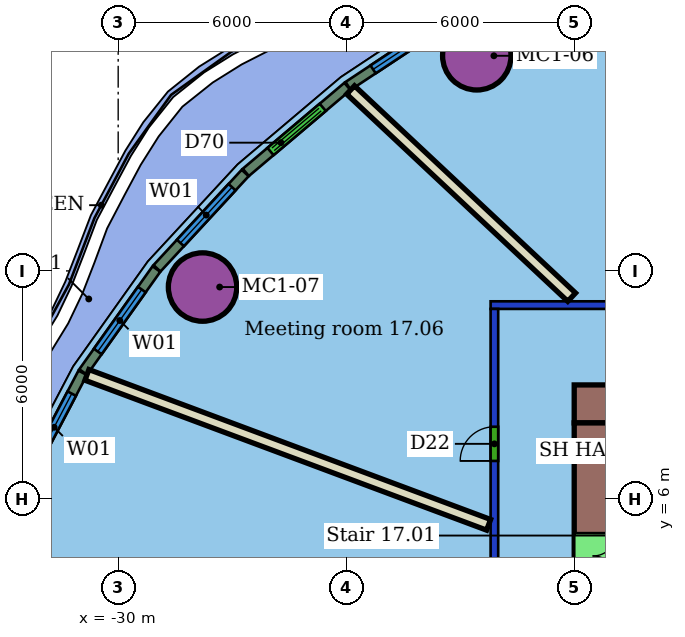
"""IFC4 building model, lengths in metres.
Left out: names, types, materials, properties, quantities, classifications, styles, units other than length and angle.
Written with IfcOpenShell. Run it as: python <this file> out.ifc"""

import sys

from ifc_helpers import new_model, si_unit, direction, frame, frame_2d, origin, origin_2d, place, context, subcontext, project, spatial, rectangle, hollow_circle, extrude, element, fill, save


model = new_model("IFC4")
c1 = context("Model", 3, precision=1e-05, world=origin(), true_north=direction((0.0, 1.0)))
c2 = subcontext(c1, "Body", "Model", "MODEL_VIEW")
j1 = project(units=[si_unit("LENGTHUNIT", "METRE"), si_unit("PLANEANGLEUNIT", "RADIAN")], contexts=[c1])
p1 = place(None, origin())
s1 = spatial("IfcSite", under=j1, at=p1, CompositionType="ELEMENT")
p2 = place(p1, origin())
s2 = spatial("IfcBuilding", under=s1, at=p2, CompositionType="ELEMENT")
p3 = place(p2, frame((0.0, 0.0, 80.4)))
s3 = spatial("IfcBuildingStorey", under=s2, at=p3, CompositionType="ELEMENT", Elevation=80.4)
for number, where, z_axis, x_axis in (
    (1, (-20.563, 17.66, 0.0), (0.0, 0.0, 1.0), (1.0, 0.0, 0.0)),
    (2, (-27.78, 11.576, 0.0), (0.0, 0.0, 1.0), (1.0, 0.0, 0.0)),
):
    element("IfcColumn", number, at=place(p3, frame(where, z_axis=z_axis, x_axis=x_axis)), inside=s3, PredefinedType="COLUMN", context=c2, shape_type="SweptSolid", body=[
        extrude(hollow_circle(Radius=0.9, WallThickness=0.06, at=origin_2d()), origin(), (0.0, 0.0, 1.0), 3.5),
    ])
p4 = place(p3, frame((-20.1, -11.0, 0.0), z_axis=(0.0, 0.0, 1.0), x_axis=(0.0, 1.0, 0.0)))
e3 = element("IfcWall", 3, at=p4, inside=s3, PredefinedType="PARTITIONING", context=c2, shape_type="SweptSolid", body=[
    extrude(rectangle(XDim=22.0, YDim=0.2, at=frame_2d((11.0, 0.0))), origin(), (0.0, 0.0, 1.0), 2.8),
])
p5 = place(p4, frame((18.0, 0.0, 0.0)))
e4 = element("IfcOpeningElement", 4, at=p5, cuts=e3, PredefinedType="OPENING", context=c2, shape_type="SweptSolid", body=[
    extrude(rectangle(XDim=0.9, YDim=2.1, at=frame_2d((0.45, 1.05))), frame((0.0, 0.11, 0.0), z_axis=(0.0, -1.0, 0.0), x_axis=(1.0, 0.0, 0.0)), (0.0, 0.0, 1.0), 0.22),
])
p6 = place(p4, frame((13.798, 0.0, 0.0)))
e5 = element("IfcOpeningElement", 5, at=p6, cuts=e3, PredefinedType="OPENING", context=c2, shape_type="SweptSolid", body=[
    extrude(rectangle(XDim=1.1, YDim=2.1, at=frame_2d((0.55, 1.05))), frame((0.0, 0.11, 0.0), z_axis=(0.0, -1.0, 0.0), x_axis=(1.0, 0.0, 0.0)), (0.0, 0.0, 1.0), 0.22),
])
p7 = place(p4, frame((8.872, 0.0, 0.0)))
e6 = element("IfcOpeningElement", 6, at=p7, cuts=e3, PredefinedType="OPENING", context=c2, shape_type="SweptSolid", body=[
    extrude(rectangle(XDim=1.2, YDim=2.1, at=frame_2d((0.6, 1.05))), frame((0.0, 0.11, 0.0), z_axis=(0.0, -1.0, 0.0), x_axis=(1.0, 0.0, 0.0)), (0.0, 0.0, 1.0), 0.22),
])
p8 = place(p4, frame((5.6, 0.0, 0.0)))
e7 = element("IfcOpeningElement", 7, at=p8, cuts=e3, PredefinedType="OPENING", context=c2, shape_type="SweptSolid", body=[
    extrude(rectangle(XDim=1.0, YDim=2.1, at=frame_2d((0.5, 1.05))), frame((0.0, 0.11, 0.0), z_axis=(0.0, -1.0, 0.0), x_axis=(1.0, 0.0, 0.0)), (0.0, 0.0, 1.0), 0.22),
])
p9 = place(p3, frame((-20.2, 11.1, 0.0), z_axis=(0.0, 0.0, 1.0), x_axis=(1.0, 0.0, 0.0)))
e8 = element("IfcWall", 8, at=p9, inside=s3, PredefinedType="PARTITIONING", context=c2, shape_type="SweptSolid", body=[
    extrude(rectangle(XDim=28.4, YDim=0.2, at=frame_2d((14.2, 0.0))), origin(), (0.0, 0.0, 1.0), 2.8),
])
p10 = place(p9, frame((24.754, 0.0, 0.0)))
e9 = element("IfcOpeningElement", 9, at=p10, cuts=e8, PredefinedType="OPENING", context=c2, shape_type="SweptSolid", body=[
    extrude(rectangle(XDim=1.0, YDim=2.1, at=frame_2d((0.5, 1.05))), frame((0.0, 0.11, 0.0), z_axis=(0.0, -1.0, 0.0), x_axis=(1.0, 0.0, 0.0)), (0.0, 0.0, 1.0), 0.22),
])
p11 = place(p9, frame((18.838, 0.0, 0.0)))
e10 = element("IfcOpeningElement", 10, at=p11, cuts=e8, PredefinedType="OPENING", context=c2, shape_type="SweptSolid", body=[
    extrude(rectangle(XDim=1.5, YDim=2.1, at=frame_2d((0.75, 1.05))), frame((0.0, 0.11, 0.0), z_axis=(0.0, -1.0, 0.0), x_axis=(1.0, 0.0, 0.0)), (0.0, 0.0, 1.0), 0.22),
])
p12 = place(p9, frame((14.85, 0.0, 0.0)))
e11 = element("IfcOpeningElement", 11, at=p12, cuts=e8, PredefinedType="OPENING", context=c2, shape_type="SweptSolid", body=[
    extrude(rectangle(XDim=0.9, YDim=2.1, at=frame_2d((0.45, 1.05))), frame((0.0, 0.11, 0.0), z_axis=(0.0, -1.0, 0.0), x_axis=(1.0, 0.0, 0.0)), (0.0, 0.0, 1.0), 0.22),
])
p13 = place(p9, frame((7.977, 0.0, 0.0)))
e12 = element("IfcOpeningElement", 12, at=p13, cuts=e8, PredefinedType="OPENING", context=c2, shape_type="SweptSolid", body=[
    extrude(rectangle(XDim=1.2, YDim=2.1, at=frame_2d((0.6, 1.05))), frame((0.0, 0.11, 0.0), z_axis=(0.0, -1.0, 0.0), x_axis=(1.0, 0.0, 0.0)), (0.0, 0.0, 1.0), 0.22),
])
p14 = place(p3, frame((-23.884, 16.761, 0.0), z_axis=(0.0, 0.0, 1.0), x_axis=(0.729643205367, -0.683828043343, 0.0)))
e13 = element("IfcWall", 13, at=p14, inside=s3, PredefinedType="PARTITIONING", context=c2, shape_type="SweptSolid", body=[
    extrude(rectangle(XDim=7.972, YDim=0.3, at=frame_2d((3.986, 0.0))), origin(), (0.0, 0.0, 1.0), 3.5),
])
p15 = place(p3, frame((-30.822, 9.264, 0.0), z_axis=(0.0, 0.0, 1.0), x_axis=(0.936877624621, -0.349657427326, 0.0)))
e14 = element("IfcWall", 14, at=p15, inside=s3, PredefinedType="PARTITIONING", context=c2, shape_type="SweptSolid", body=[
    extrude(rectangle(XDim=11.282, YDim=0.3, at=frame_2d((5.641, 0.0))), origin(), (0.0, 0.0, 1.0), 3.5),
])
p16 = place(p3, frame((-20.968, 18.843, 0.0), z_axis=(0.0, 0.0, 1.0), x_axis=(-0.833653527953, -0.552287783073, 0.0)))
e15 = element("IfcWall", 15, at=p16, inside=s3, PredefinedType="SOLIDWALL", context=c2, shape_type="SweptSolid", body=[
    extrude(rectangle(XDim=3.577, YDim=0.25, at=frame_2d((1.788, 0.0))), origin(), (0.0, 0.0, 1.0), 3.1),
])
p17 = place(p16, frame((0.788, 0.0, 0.8)))
e16 = element("IfcOpeningElement", 16, at=p17, cuts=e15, PredefinedType="OPENING", context=c2, shape_type="SweptSolid", body=[
    extrude(rectangle(XDim=2.0, YDim=2.2, at=frame_2d((1.0, 1.1))), frame((0.0, 0.135, 0.0), z_axis=(0.0, -1.0, 0.0), x_axis=(1.0, 0.0, 0.0)), (0.0, 0.0, 1.0), 0.27),
])
p18 = place(p3, frame((-23.968, 16.854, 0.0), z_axis=(0.0, 0.0, 1.0), x_axis=(-0.76352642001, -0.645776591358, 0.0)))
e17 = element("IfcWall", 17, at=p18, inside=s3, PredefinedType="SOLIDWALL", context=c2, shape_type="SweptSolid", body=[
    extrude(rectangle(XDim=3.502, YDim=0.25, at=frame_2d((1.751, 0.0))), origin(), (0.0, 0.0, 1.0), 3.1),
])
p19 = place(p18, frame((0.851, 0.0, 0.0)))
e18 = element("IfcOpeningElement", 18, at=p19, cuts=e17, PredefinedType="OPENING", context=c2, shape_type="SweptSolid", body=[
    extrude(rectangle(XDim=1.8, YDim=2.4, at=frame_2d((0.9, 1.2))), frame((0.0, 0.135, 0.0), z_axis=(0.0, -1.0, 0.0), x_axis=(1.0, 0.0, 0.0)), (0.0, 0.0, 1.0), 0.27),
])
p20 = place(p3, frame((-26.658, 14.576, 0.0), z_axis=(0.0, 0.0, 1.0), x_axis=(-0.679170019498, -0.733980983824, 0.0)))
e19 = element("IfcWall", 19, at=p20, inside=s3, PredefinedType="SOLIDWALL", context=c2, shape_type="SweptSolid", body=[
    extrude(rectangle(XDim=3.417, YDim=0.25, at=frame_2d((1.708, 0.0))), origin(), (0.0, 0.0, 1.0), 3.1),
])
p21 = place(p20, frame((0.508, 0.0, 0.8)))
e20 = element("IfcOpeningElement", 20, at=p21, cuts=e19, PredefinedType="OPENING", context=c2, shape_type="SweptSolid", body=[
    extrude(rectangle(XDim=2.0, YDim=2.2, at=frame_2d((1.0, 1.1))), frame((0.0, 0.135, 0.0), z_axis=(0.0, -1.0, 0.0), x_axis=(1.0, 0.0, 0.0)), (0.0, 0.0, 1.0), 0.27),
])
p22 = place(p3, frame((-28.994, 12.05, 0.0), z_axis=(0.0, 0.0, 1.0), x_axis=(-0.579570373791, -0.814922193724, 0.0)))
e21 = element("IfcWall", 21, at=p22, inside=s3, PredefinedType="SOLIDWALL", context=c2, shape_type="SweptSolid", body=[
    extrude(rectangle(XDim=3.326, YDim=0.25, at=frame_2d((1.663, 0.0))), origin(), (0.0, 0.0, 1.0), 3.1),
])
p23 = place(p22, frame((0.663, 0.0, 0.8)))
e22 = element("IfcOpeningElement", 22, at=p23, cuts=e21, PredefinedType="OPENING", context=c2, shape_type="SweptSolid", body=[
    extrude(rectangle(XDim=2.0, YDim=2.2, at=frame_2d((1.0, 1.1))), frame((0.0, 0.135, 0.0), z_axis=(0.0, -1.0, 0.0), x_axis=(1.0, 0.0, 0.0)), (0.0, 0.0, 1.0), 0.27),
])
p24 = place(p3, frame((-30.935, 9.318, 0.0), z_axis=(0.0, 0.0, 1.0), x_axis=(-0.464455263318, -0.885596583314, 0.0)))
e23 = element("IfcWall", 23, at=p24, inside=s3, PredefinedType="SOLIDWALL", context=c2, shape_type="SweptSolid", body=[
    extrude(rectangle(XDim=3.235, YDim=0.25, at=frame_2d((1.618, 0.0))), origin(), (0.0, 0.0, 1.0), 3.1),
])
p25 = place(p24, frame((0.618, 0.0, 0.8)))
e24 = element("IfcOpeningElement", 24, at=p25, cuts=e23, PredefinedType="OPENING", context=c2, shape_type="SweptSolid", body=[
    extrude(rectangle(XDim=2.0, YDim=2.2, at=frame_2d((1.0, 1.1))), frame((0.0, 0.135, 0.0), z_axis=(0.0, -1.0, 0.0), x_axis=(1.0, 0.0, 0.0)), (0.0, 0.0, 1.0), 0.27),
])
p26 = place(p3, frame((-6.0, 8.5, 0.0), z_axis=(0.0, 0.0, 1.0), x_axis=(-1.0, 0.0, 0.0)))
e25 = element("IfcWall", 25, at=p26, inside=s3, PredefinedType="SHEAR", context=c2, shape_type="SweptSolid", body=[
    extrude(rectangle(XDim=12.0, YDim=1.0, at=frame_2d((6.0, 0.0))), origin(), (0.0, 0.0, 1.0), 3.4),
])
p27 = place(p26, frame((5.2, 0.0, 0.0)))
e26 = element("IfcOpeningElement", 26, at=p27, cuts=e25, PredefinedType="OPENING", context=c2, shape_type="SweptSolid", body=[
    extrude(rectangle(XDim=1.2, YDim=2.1, at=frame_2d((0.6, 1.05))), frame((0.0, 0.51, 0.0), z_axis=(0.0, -1.0, 0.0), x_axis=(1.0, 0.0, 0.0)), (0.0, 0.0, 1.0), 1.02),
])
p28 = place(p3, frame((-17.5, 8.0, 0.0), z_axis=(0.0, 0.0, 1.0), x_axis=(0.0, -1.0, 0.0)))
e27 = element("IfcWall", 27, at=p28, inside=s3, PredefinedType="SHEAR", context=c2, shape_type="SweptSolid", body=[
    extrude(rectangle(XDim=16.0, YDim=1.0, at=frame_2d((8.0, 0.0))), origin(), (0.0, 0.0, 1.0), 3.4),
])
p29 = place(p28, frame((11.9, 0.0, 0.0)))
e28 = element("IfcOpeningElement", 28, at=p29, cuts=e27, PredefinedType="OPENING", context=c2, shape_type="SweptSolid", body=[
    extrude(rectangle(XDim=1.2, YDim=2.1, at=frame_2d((0.6, 1.05))), frame((0.0, 0.51, 0.0), z_axis=(0.0, -1.0, 0.0), x_axis=(1.0, 0.0, 0.0)), (0.0, 0.0, 1.0), 1.02),
])
p30 = place(p28, frame((2.9, 0.0, 0.0)))
e29 = element("IfcOpeningElement", 29, at=p30, cuts=e27, PredefinedType="OPENING", context=c2, shape_type="SweptSolid", body=[
    extrude(rectangle(XDim=1.2, YDim=2.1, at=frame_2d((0.6, 1.05))), frame((0.0, 0.51, 0.0), z_axis=(0.0, -1.0, 0.0), x_axis=(1.0, 0.0, 0.0)), (0.0, 0.0, 1.0), 1.02),
])
p31 = place(p5, origin())
e30 = element("IfcDoor", 30, at=p31, inside=s3, OperationType="SINGLE_SWING_LEFT", PredefinedType="DOOR", context=c2, shape_type="SweptSolid", body=[
    extrude(rectangle(XDim=0.9, YDim=2.1, at=frame_2d((0.45, 1.05))), frame((0.0, 0.025, 0.0), z_axis=(0.0, -1.0, 0.0), x_axis=(1.0, 0.0, 0.0)), (0.0, 0.0, 1.0), 0.05),
])
fill(e4, e30)
p32 = place(p17, origin())
e31 = element("IfcWindow", 31, at=p32, inside=s3, PartitioningType="SINGLE_PANEL", PredefinedType="WINDOW", context=c2, shape_type="SweptSolid", body=[
    extrude(rectangle(XDim=2.0, YDim=2.2, at=frame_2d((1.0, 1.1))), frame((0.0, 0.03, 0.0), z_axis=(0.0, -1.0, 0.0), x_axis=(1.0, 0.0, 0.0)), (0.0, 0.0, 1.0), 0.06),
])
fill(e16, e31)
p33 = place(p19, origin())
e32 = element("IfcDoor", 32, at=p33, inside=s3, OperationType="DOUBLE_DOOR_SLIDING", PredefinedType="DOOR", context=c2, shape_type="SweptSolid", body=[
    extrude(rectangle(XDim=1.8, YDim=2.4, at=frame_2d((0.9, 1.2))), frame((0.0, 0.025, 0.0), z_axis=(0.0, -1.0, 0.0), x_axis=(1.0, 0.0, 0.0)), (0.0, 0.0, 1.0), 0.05),
])
fill(e18, e32)
p34 = place(p21, origin())
e33 = element("IfcWindow", 33, at=p34, inside=s3, PartitioningType="SINGLE_PANEL", PredefinedType="WINDOW", context=c2, shape_type="SweptSolid", body=[
    extrude(rectangle(XDim=2.0, YDim=2.2, at=frame_2d((1.0, 1.1))), frame((0.0, 0.03, 0.0), z_axis=(0.0, -1.0, 0.0), x_axis=(1.0, 0.0, 0.0)), (0.0, 0.0, 1.0), 0.06),
])
fill(e20, e33)
p35 = place(p23, origin())
e34 = element("IfcWindow", 34, at=p35, inside=s3, PartitioningType="SINGLE_PANEL", PredefinedType="WINDOW", context=c2, shape_type="SweptSolid", body=[
    extrude(rectangle(XDim=2.0, YDim=2.2, at=frame_2d((1.0, 1.1))), frame((0.0, 0.03, 0.0), z_axis=(0.0, -1.0, 0.0), x_axis=(1.0, 0.0, 0.0)), (0.0, 0.0, 1.0), 0.06),
])
fill(e22, e34)
p36 = place(p25, origin())
e35 = element("IfcWindow", 35, at=p36, inside=s3, PartitioningType="SINGLE_PANEL", PredefinedType="WINDOW", context=c2, shape_type="SweptSolid", body=[
    extrude(rectangle(XDim=2.0, YDim=2.2, at=frame_2d((1.0, 1.1))), frame((0.0, 0.03, 0.0), z_axis=(0.0, -1.0, 0.0), x_axis=(1.0, 0.0, 0.0)), (0.0, 0.0, 1.0), 0.06),
])
fill(e24, e35)
p37 = place(p30, origin())
e36 = element("IfcDoor", 36, at=p37, inside=s3, OperationType="DOUBLE_DOOR_SINGLE_SWING", PredefinedType="NOTDEFINED", context=c2, shape_type="SweptSolid", body=[
    extrude(rectangle(XDim=1.2, YDim=2.1, at=frame_2d((0.6, 1.05))), frame((0.0, 0.025, 0.0), z_axis=(0.0, -1.0, 0.0), x_axis=(1.0, 0.0, 0.0)), (0.0, 0.0, 1.0), 0.05),
])
fill(e29, e36)
save(model, sys.argv[1])
